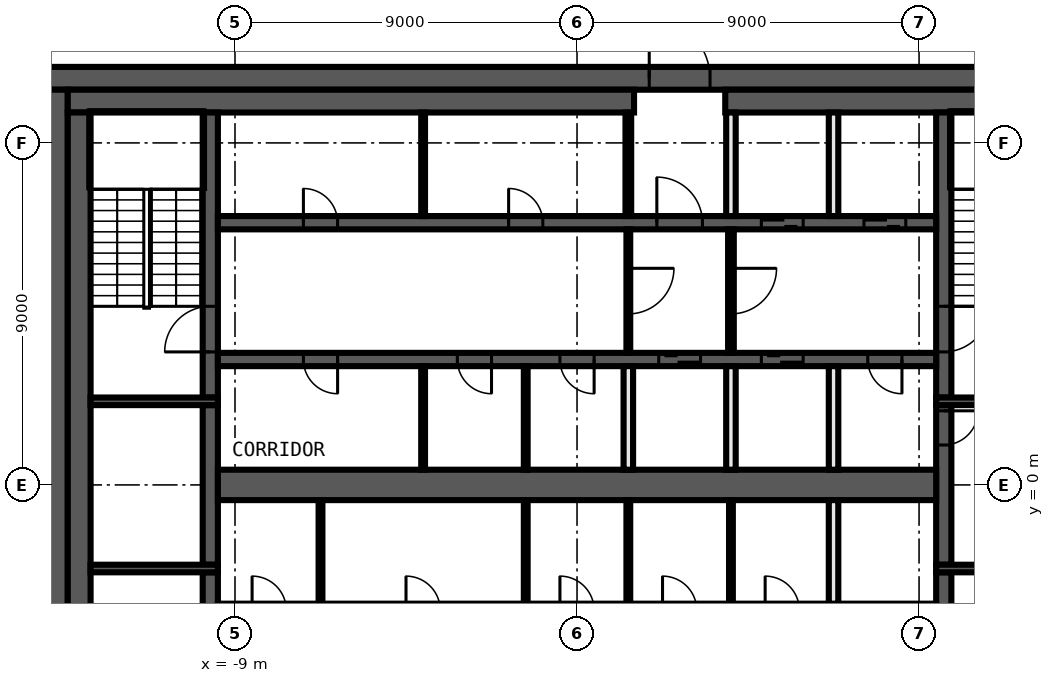
"""IFC4 building model, lengths in metres.
Left out: names, types, materials, properties, quantities, classifications, styles, units other than length and angle.
Written with IfcOpenShell. Run it as: python <this file> out.ifc"""

import sys

from ifc_helpers import new_model, si_unit, direction, frame, frame_2d, origin, place, context, subcontext, project, spatial, rectangle, extrude, element, fill, save


model = new_model("IFC4")
c1 = context("Model", 3, precision=1e-05, world=origin(), true_north=direction((0.0, 1.0)))
c2 = subcontext(c1, "Body", "Model", "MODEL_VIEW")
j1 = project(units=[si_unit("LENGTHUNIT", "METRE"), si_unit("PLANEANGLEUNIT", "RADIAN")], contexts=[c1])
p1 = place(None, origin())
s1 = spatial("IfcSite", under=j1, at=p1, CompositionType="ELEMENT")
p2 = place(p1, origin())
s2 = spatial("IfcBuilding", under=s1, at=p2, CompositionType="ELEMENT")
p3 = place(p2, frame((0.0, 0.0, 294.2)))
s3 = spatial("IfcBuildingStorey", under=s2, at=p3, CompositionType="ELEMENT", Elevation=294.2)
p4 = place(p3, frame((-14.0, 10.7, 0.0), z_axis=(0.0, 0.0, 1.0), x_axis=(1.0, 0.0, 0.0)))
e1 = element("IfcWall", 1, at=p4, inside=s3, PredefinedType="SHEAR", context=c2, shape_type="SweptSolid", body=[
    extrude(rectangle(XDim=28.0, YDim=0.6, at=frame_2d((14.0, 0.0))), origin(), (0.0, 0.0, 1.0), 3.82),
])
p5 = place(p4, frame((15.9, 0.0, 0.0)))
e2 = element("IfcOpeningElement", 2, at=p5, cuts=e1, PredefinedType="OPENING", context=c2, shape_type="SweptSolid", body=[
    extrude(rectangle(XDim=1.6, YDim=2.1, at=frame_2d((0.8, 1.05))), frame((0.0, 0.31, 0.0), z_axis=(0.0, -1.0, 0.0), x_axis=(1.0, 0.0, 0.0)), (0.0, 0.0, 1.0), 0.62),
])
p6 = place(p3, frame((-13.7, -10.4, 0.0), z_axis=(0.0, 0.0, 1.0), x_axis=(0.0, 1.0, 0.0)))
e3 = element("IfcWall", 3, at=p6, inside=s3, PredefinedType="SHEAR", context=c2, shape_type="SweptSolid", body=[
    extrude(rectangle(XDim=20.8, YDim=0.6, at=frame_2d((10.4, 0.0))), origin(), (0.0, 0.0, 1.0), 3.82),
])
p7 = place(p3, frame((-13.4, 10.1, 0.0), z_axis=(0.0, 0.0, 1.0), x_axis=(1.0, 0.0, 0.0)))
e4 = element("IfcWall", 4, at=p7, inside=s3, PredefinedType="SHEAR", context=c2, shape_type="SweptSolid", body=[
    extrude(rectangle(XDim=14.9, YDim=0.6, at=frame_2d((7.45, 0.0))), origin(), (0.0, 0.0, 1.0), 3.82),
])
p8 = place(p3, frame((3.9, 10.1, 0.0), z_axis=(0.0, 0.0, 1.0), x_axis=(1.0, 0.0, 0.0)))
e5 = element("IfcWall", 5, at=p8, inside=s3, PredefinedType="SHEAR", context=c2, shape_type="SweptSolid", body=[
    extrude(rectangle(XDim=9.5, YDim=0.6, at=frame_2d((4.75, 0.0))), origin(), (0.0, 0.0, 1.0), 3.82),
])
p9 = place(p3, frame((-13.1, -9.8, 0.0), z_axis=(0.0, 0.0, 1.0), x_axis=(0.0, 1.0, 0.0)))
e6 = element("IfcWall", 6, at=p9, inside=s3, PredefinedType="SHEAR", context=c2, shape_type="SweptSolid", body=[
    extrude(rectangle(XDim=19.6, YDim=0.6, at=frame_2d((9.8, 0.0))), origin(), (0.0, 0.0, 1.0), 3.82),
])
p10 = place(p3, frame((9.65, -2.3, 0.0), z_axis=(0.0, 0.0, 1.0), x_axis=(0.0, -1.0, 0.0)))
e7 = element("IfcWall", 7, at=p10, inside=s3, PredefinedType="SHEAR", context=c2, shape_type="SweptSolid", body=[
    extrude(rectangle(XDim=7.5, YDim=0.4, at=frame_2d((3.75, 0.0))), origin(), (0.0, 0.0, 1.0), 3.82),
])
p11 = place(p10, frame((1.2, 0.0, 0.0)))
e8 = element("IfcOpeningElement", 8, at=p11, cuts=e7, PredefinedType="OPENING", context=c2, shape_type="SweptSolid", body=[
    extrude(rectangle(XDim=1.2, YDim=2.1, at=frame_2d((0.6, 1.05))), frame((0.0, 0.21, 0.0), z_axis=(0.0, -1.0, 0.0), x_axis=(1.0, 0.0, 0.0)), (0.0, 0.0, 1.0), 0.42),
])
p12 = place(p3, frame((9.65, 2.1, 0.0), z_axis=(0.0, 0.0, 1.0), x_axis=(0.0, -1.0, 0.0)))
e9 = element("IfcWall", 9, at=p12, inside=s3, PredefinedType="SHEAR", context=c2, shape_type="SweptSolid", body=[
    extrude(rectangle(XDim=4.2, YDim=0.4, at=frame_2d((2.1, 0.0))), origin(), (0.0, 0.0, 1.0), 3.82),
])
p13 = place(p12, frame((0.15, 0.0, 0.0)))
e10 = element("IfcOpeningElement", 10, at=p13, cuts=e9, PredefinedType="OPENING", context=c2, shape_type="SweptSolid", body=[
    extrude(rectangle(XDim=0.9, YDim=2.1, at=frame_2d((0.45, 1.05))), frame((0.0, 0.21, 0.0), z_axis=(0.0, -1.0, 0.0), x_axis=(1.0, 0.0, 0.0)), (0.0, 0.0, 1.0), 0.42),
])
p14 = place(p3, frame((9.65, 9.8, 0.0), z_axis=(0.0, 0.0, 1.0), x_axis=(0.0, -1.0, 0.0)))
e11 = element("IfcWall", 11, at=p14, inside=s3, PredefinedType="SHEAR", context=c2, shape_type="SweptSolid", body=[
    extrude(rectangle(XDim=7.5, YDim=0.4, at=frame_2d((3.75, 0.0))), origin(), (0.0, 0.0, 1.0), 3.82),
])
p15 = place(p14, frame((5.1, 0.0, 0.0)))
e12 = element("IfcOpeningElement", 12, at=p15, cuts=e11, PredefinedType="OPENING", context=c2, shape_type="SweptSolid", body=[
    extrude(rectangle(XDim=1.2, YDim=2.1, at=frame_2d((0.6, 1.05))), frame((0.0, 0.21, 0.0), z_axis=(0.0, -1.0, 0.0), x_axis=(1.0, 0.0, 0.0)), (0.0, 0.0, 1.0), 0.42),
])
p16 = place(p3, frame((-9.65, -9.8, 0.0), z_axis=(0.0, 0.0, 1.0), x_axis=(0.0, 1.0, 0.0)))
e13 = element("IfcWall", 13, at=p16, inside=s3, PredefinedType="SHEAR", context=c2, shape_type="SweptSolid", body=[
    extrude(rectangle(XDim=7.5, YDim=0.4, at=frame_2d((3.75, 0.0))), origin(), (0.0, 0.0, 1.0), 3.82),
])
p17 = place(p16, frame((5.1, 0.0, 0.0)))
e14 = element("IfcOpeningElement", 14, at=p17, cuts=e13, PredefinedType="OPENING", context=c2, shape_type="SweptSolid", body=[
    extrude(rectangle(XDim=1.2, YDim=2.1, at=frame_2d((0.6, 1.05))), frame((0.0, 0.21, 0.0), z_axis=(0.0, -1.0, 0.0), x_axis=(1.0, 0.0, 0.0)), (0.0, 0.0, 1.0), 0.42),
])
p18 = place(p3, frame((-9.65, -2.1, 0.0), z_axis=(0.0, 0.0, 1.0), x_axis=(0.0, 1.0, 0.0)))
e15 = element("IfcWall", 15, at=p18, inside=s3, PredefinedType="SHEAR", context=c2, shape_type="SweptSolid", body=[
    extrude(rectangle(XDim=4.2, YDim=0.4, at=frame_2d((2.1, 0.0))), origin(), (0.0, 0.0, 1.0), 3.82),
])
p19 = place(p3, frame((-9.65, 2.3, 0.0), z_axis=(0.0, 0.0, 1.0), x_axis=(0.0, 1.0, 0.0)))
e16 = element("IfcWall", 16, at=p19, inside=s3, PredefinedType="SHEAR", context=c2, shape_type="SweptSolid", body=[
    extrude(rectangle(XDim=7.5, YDim=0.4, at=frame_2d((3.75, 0.0))), origin(), (0.0, 0.0, 1.0), 3.82),
])
p20 = place(p19, frame((1.2, 0.0, 0.0)))
e17 = element("IfcOpeningElement", 17, at=p20, cuts=e16, PredefinedType="OPENING", context=c2, shape_type="SweptSolid", body=[
    extrude(rectangle(XDim=1.2, YDim=2.1, at=frame_2d((0.6, 1.05))), frame((0.0, 0.21, 0.0), z_axis=(0.0, -1.0, 0.0), x_axis=(1.0, 0.0, 0.0)), (0.0, 0.0, 1.0), 0.42),
])
for number, where, z_axis, x_axis in (
    (18, (9.45, 2.2, 0.0), (0.0, 0.0, 1.0), (1.0, 0.0, 0.0)),
    (19, (-9.45, 2.2, 0.0), (0.0, 0.0, 1.0), (-1.0, 0.0, 0.0)),
    (20, (9.45, -2.2, 0.0), (0.0, 0.0, 1.0), (1.0, 0.0, 0.0)),
    (21, (-9.45, -2.2, 0.0), (0.0, 0.0, 1.0), (-1.0, 0.0, 0.0)),
):
    element("IfcWall", number, at=place(p3, frame(where, z_axis=z_axis, x_axis=x_axis)), inside=s3, PredefinedType="SHEAR", context=c2, shape_type="SweptSolid", body=[
        extrude(rectangle(XDim=3.35, YDim=0.2, at=frame_2d((1.675, 0.0))), origin(), (0.0, 0.0, 1.0), 3.82),
    ])
p21 = place(p3, frame((-9.45, 6.9, 0.0), z_axis=(0.0, 0.0, 1.0), x_axis=(1.0, 0.0, 0.0)))
e22 = element("IfcWall", 22, at=p21, inside=s3, PredefinedType="SHEAR", context=c2, shape_type="SweptSolid", body=[
    extrude(rectangle(XDim=18.9, YDim=0.35, at=frame_2d((9.45, 0.0))), origin(), (0.0, 0.0, 1.0), 3.82),
])
p22 = place(p21, frame((11.55, 0.0, 0.0)))
e23 = element("IfcOpeningElement", 23, at=p22, cuts=e22, PredefinedType="OPENING", context=c2, shape_type="SweptSolid", body=[
    extrude(rectangle(XDim=1.2, YDim=2.1, at=frame_2d((0.6, 1.05))), frame((0.0, 0.185, 0.0), z_axis=(0.0, -1.0, 0.0), x_axis=(1.0, 0.0, 0.0)), (0.0, 0.0, 1.0), 0.37),
])
p23 = place(p21, frame((14.3, 0.0, 0.0)))
e24 = element("IfcOpeningElement", 24, at=p23, cuts=e22, PredefinedType="OPENING", context=c2, shape_type="SweptSolid", body=[
    extrude(rectangle(XDim=1.1, YDim=2.1, at=frame_2d((0.55, 1.05))), frame((0.0, 0.185, 0.0), z_axis=(0.0, -1.0, 0.0), x_axis=(1.0, 0.0, 0.0)), (0.0, 0.0, 1.0), 0.37),
])
p24 = place(p21, frame((17.0, 0.0, 0.0)))
e25 = element("IfcOpeningElement", 25, at=p24, cuts=e22, PredefinedType="OPENING", context=c2, shape_type="SweptSolid", body=[
    extrude(rectangle(XDim=1.1, YDim=2.1, at=frame_2d((0.55, 1.05))), frame((0.0, 0.185, 0.0), z_axis=(0.0, -1.0, 0.0), x_axis=(1.0, 0.0, 0.0)), (0.0, 0.0, 1.0), 0.37),
])
p25 = place(p21, frame((2.25, 0.0, 0.0)))
e26 = element("IfcOpeningElement", 26, at=p25, cuts=e22, PredefinedType="OPENING", context=c2, shape_type="SweptSolid", body=[
    extrude(rectangle(XDim=0.9, YDim=2.1, at=frame_2d((0.45, 1.05))), frame((0.0, 0.185, 0.0), z_axis=(0.0, -1.0, 0.0), x_axis=(1.0, 0.0, 0.0)), (0.0, 0.0, 1.0), 0.37),
])
p26 = place(p21, frame((7.65, 0.0, 0.0)))
e27 = element("IfcOpeningElement", 27, at=p26, cuts=e22, PredefinedType="OPENING", context=c2, shape_type="SweptSolid", body=[
    extrude(rectangle(XDim=0.9, YDim=2.1, at=frame_2d((0.45, 1.05))), frame((0.0, 0.185, 0.0), z_axis=(0.0, -1.0, 0.0), x_axis=(1.0, 0.0, 0.0)), (0.0, 0.0, 1.0), 0.37),
])
p27 = place(p3, frame((9.45, 3.3, 0.0), z_axis=(0.0, 0.0, 1.0), x_axis=(-1.0, 0.0, 0.0)))
e28 = element("IfcWall", 28, at=p27, inside=s3, PredefinedType="SHEAR", context=c2, shape_type="SweptSolid", body=[
    extrude(rectangle(XDim=18.9, YDim=0.35, at=frame_2d((9.45, 0.0))), origin(), (0.0, 0.0, 1.0), 3.82),
])
p28 = place(p27, frame((6.2, 0.0, 0.0)))
e29 = element("IfcOpeningElement", 29, at=p28, cuts=e28, PredefinedType="OPENING", context=c2, shape_type="SweptSolid", body=[
    extrude(rectangle(XDim=1.1, YDim=2.1, at=frame_2d((0.55, 1.05))), frame((0.0, 0.185, 0.0), z_axis=(0.0, -1.0, 0.0), x_axis=(1.0, 0.0, 0.0)), (0.0, 0.0, 1.0), 0.37),
])
p29 = place(p27, frame((3.5, 0.0, 0.0)))
e30 = element("IfcOpeningElement", 30, at=p29, cuts=e28, PredefinedType="OPENING", context=c2, shape_type="SweptSolid", body=[
    extrude(rectangle(XDim=1.1, YDim=2.1, at=frame_2d((0.55, 1.05))), frame((0.0, 0.185, 0.0), z_axis=(0.0, -1.0, 0.0), x_axis=(1.0, 0.0, 0.0)), (0.0, 0.0, 1.0), 0.37),
])
p30 = place(p27, frame((0.9, 0.0, 0.0)))
e31 = element("IfcOpeningElement", 31, at=p30, cuts=e28, PredefinedType="OPENING", context=c2, shape_type="SweptSolid", body=[
    extrude(rectangle(XDim=0.9, YDim=2.1, at=frame_2d((0.45, 1.05))), frame((0.0, 0.185, 0.0), z_axis=(0.0, -1.0, 0.0), x_axis=(1.0, 0.0, 0.0)), (0.0, 0.0, 1.0), 0.37),
])
p31 = place(p27, frame((15.75, 0.0, 0.0)))
e32 = element("IfcOpeningElement", 32, at=p31, cuts=e28, PredefinedType="OPENING", context=c2, shape_type="SweptSolid", body=[
    extrude(rectangle(XDim=0.9, YDim=2.1, at=frame_2d((0.45, 1.05))), frame((0.0, 0.185, 0.0), z_axis=(0.0, -1.0, 0.0), x_axis=(1.0, 0.0, 0.0)), (0.0, 0.0, 1.0), 0.37),
])
p32 = place(p27, frame((11.7, 0.0, 0.0)))
e33 = element("IfcOpeningElement", 33, at=p32, cuts=e28, PredefinedType="OPENING", context=c2, shape_type="SweptSolid", body=[
    extrude(rectangle(XDim=0.9, YDim=2.1, at=frame_2d((0.45, 1.05))), frame((0.0, 0.185, 0.0), z_axis=(0.0, -1.0, 0.0), x_axis=(1.0, 0.0, 0.0)), (0.0, 0.0, 1.0), 0.37),
])
p33 = place(p27, frame((9.0, 0.0, 0.0)))
e34 = element("IfcOpeningElement", 34, at=p33, cuts=e28, PredefinedType="OPENING", context=c2, shape_type="SweptSolid", body=[
    extrude(rectangle(XDim=0.9, YDim=2.1, at=frame_2d((0.45, 1.05))), frame((0.0, 0.185, 0.0), z_axis=(0.0, -1.0, 0.0), x_axis=(1.0, 0.0, 0.0)), (0.0, 0.0, 1.0), 0.37),
])
p34 = place(p3, frame((-9.45, 0.0, 0.0), z_axis=(0.0, 0.0, 1.0), x_axis=(1.0, 0.0, 0.0)))
e35 = element("IfcWall", 35, at=p34, inside=s3, PredefinedType="SHEAR", context=c2, shape_type="SweptSolid", body=[
    extrude(rectangle(XDim=18.9, YDim=0.8, at=frame_2d((9.45, 0.0))), origin(), (0.0, 0.0, 1.0), 3.82),
])
for number, where, z_axis, x_axis in (
    (36, (6.75, -3.125, 0.0), (0.0, 0.0, 1.0), (0.0, 1.0, 0.0)),
    (37, (6.75, 0.4, 0.0), (0.0, 0.0, 1.0), (0.0, 1.0, 0.0)),
    (38, (6.75, 7.075, 0.0), (0.0, 0.0, 1.0), (0.0, 1.0, 0.0)),
):
    element("IfcWall", number, at=place(p3, frame(where, z_axis=z_axis, x_axis=x_axis)), inside=s3, PredefinedType="SOLIDWALL", context=c2, shape_type="SweptSolid", body=[
        extrude(rectangle(XDim=2.725, YDim=0.25, at=frame_2d((1.363, 0.0))), origin(), (0.0, 0.0, 1.0), 3.82),
    ])
p35 = place(p3, frame((4.05, 6.725, 0.0), z_axis=(0.0, 0.0, 1.0), x_axis=(0.0, -1.0, 0.0)))
e39 = element("IfcWall", 39, at=p35, inside=s3, PredefinedType="PARTITIONING", context=c2, shape_type="SweptSolid", body=[
    extrude(rectangle(XDim=3.25, YDim=0.15, at=frame_2d((1.625, 0.0))), origin(), (0.0, 0.0, 1.0), 3.82),
])
p36 = place(p35, frame((1.025, 0.0, 0.0)))
e40 = element("IfcOpeningElement", 40, at=p36, cuts=e39, PredefinedType="OPENING", context=c2, shape_type="SweptSolid", body=[
    extrude(rectangle(XDim=1.2, YDim=2.1, at=frame_2d((0.6, 1.05))), frame((0.0, 0.085, 0.0), z_axis=(0.0, -1.0, 0.0), x_axis=(1.0, 0.0, 0.0)), (0.0, 0.0, 1.0), 0.17),
])
p37 = place(p3, frame((4.05, -3.125, 0.0), z_axis=(0.0, 0.0, 1.0), x_axis=(0.0, 1.0, 0.0)))
e41 = element("IfcWall", 41, at=p37, inside=s3, PredefinedType="PARTITIONING", context=c2, shape_type="SweptSolid", body=[
    extrude(rectangle(XDim=2.725, YDim=0.1, at=frame_2d((1.363, 0.0))), origin(), (0.0, 0.0, 1.0), 3.82),
])
for number, where, z_axis, x_axis in (
    (42, (4.05, 0.4, 0.0), (0.0, 0.0, 1.0), (0.0, 1.0, 0.0)),
    (43, (4.05, 7.075, 0.0), (0.0, 0.0, 1.0), (0.0, 1.0, 0.0)),
):
    element("IfcWall", number, at=place(p3, frame(where, z_axis=z_axis, x_axis=x_axis)), inside=s3, PredefinedType="SOLIDWALL", context=c2, shape_type="SweptSolid", body=[
        extrude(rectangle(XDim=2.725, YDim=0.25, at=frame_2d((1.363, 0.0))), origin(), (0.0, 0.0, 1.0), 3.82),
    ])
p38 = place(p3, frame((1.35, 7.075, 0.0), z_axis=(0.0, 0.0, 1.0), x_axis=(0.0, 1.0, 0.0)))
e44 = element("IfcWall", 44, at=p38, inside=s3, PredefinedType="PARTITIONING", context=c2, shape_type="SweptSolid", body=[
    extrude(rectangle(XDim=2.725, YDim=0.15, at=frame_2d((1.363, 0.0))), origin(), (0.0, 0.0, 1.0), 3.82),
])
p39 = place(p3, frame((1.35, -3.125, 0.0), z_axis=(0.0, 0.0, 1.0), x_axis=(0.0, 1.0, 0.0)))
e45 = element("IfcWall", 45, at=p39, inside=s3, PredefinedType="PARTITIONING", context=c2, shape_type="SweptSolid", body=[
    extrude(rectangle(XDim=2.725, YDim=0.1, at=frame_2d((1.363, 0.0))), origin(), (0.0, 0.0, 1.0), 3.82),
])
p40 = place(p3, frame((1.35, 6.725, 0.0), z_axis=(0.0, 0.0, 1.0), x_axis=(0.0, -1.0, 0.0)))
e46 = element("IfcWall", 46, at=p40, inside=s3, PredefinedType="PARTITIONING", context=c2, shape_type="SweptSolid", body=[
    extrude(rectangle(XDim=3.25, YDim=0.1, at=frame_2d((1.625, 0.0))), origin(), (0.0, 0.0, 1.0), 3.82),
])
p41 = place(p40, frame((1.025, 0.0, 0.0)))
e47 = element("IfcOpeningElement", 47, at=p41, cuts=e46, PredefinedType="OPENING", context=c2, shape_type="SweptSolid", body=[
    extrude(rectangle(XDim=1.2, YDim=2.1, at=frame_2d((0.6, 1.05))), frame((0.0, 0.06, 0.0), z_axis=(0.0, -1.0, 0.0), x_axis=(1.0, 0.0, 0.0)), (0.0, 0.0, 1.0), 0.12),
])
p42 = place(p3, frame((1.35, 0.4, 0.0), z_axis=(0.0, 0.0, 1.0), x_axis=(0.0, 1.0, 0.0)))
e48 = element("IfcWall", 48, at=p42, inside=s3, PredefinedType="SOLIDWALL", context=c2, shape_type="SweptSolid", body=[
    extrude(rectangle(XDim=2.725, YDim=0.25, at=frame_2d((1.363, 0.0))), origin(), (0.0, 0.0, 1.0), 3.82),
])
for number, where, z_axis, x_axis in (
    (49, (-1.35, -3.125, 0.0), (0.0, 0.0, 1.0), (0.0, 1.0, 0.0)),
    (50, (-1.35, 0.4, 0.0), (0.0, 0.0, 1.0), (0.0, 1.0, 0.0)),
    (51, (-4.05, 0.4, 0.0), (0.0, 0.0, 1.0), (0.0, 1.0, 0.0)),
    (52, (-4.05, 7.075, 0.0), (0.0, 0.0, 1.0), (0.0, 1.0, 0.0)),
    (53, (-6.75, -3.125, 0.0), (0.0, 0.0, 1.0), (0.0, 1.0, 0.0)),
):
    element("IfcWall", number, at=place(p3, frame(where, z_axis=z_axis, x_axis=x_axis)), inside=s3, PredefinedType="PARTITIONING", context=c2, shape_type="SweptSolid", body=[
        extrude(rectangle(XDim=2.725, YDim=0.1, at=frame_2d((1.363, 0.0))), origin(), (0.0, 0.0, 1.0), 3.82),
    ])
p43 = place(p13, origin())
e54 = element("IfcDoor", 54, at=p43, inside=s3, OperationType="SINGLE_SWING_RIGHT", PredefinedType="DOOR", context=c2, shape_type="SweptSolid", body=[
    extrude(rectangle(XDim=0.9, YDim=2.1, at=frame_2d((0.45, 1.05))), frame((0.0, 0.025, 0.0), z_axis=(0.0, -1.0, 0.0), x_axis=(1.0, 0.0, 0.0)), (0.0, 0.0, 1.0), 0.05),
])
fill(e10, e54)
p44 = place(p5, origin())
e55 = element("IfcDoor", 55, at=p44, inside=s3, OperationType="DOUBLE_DOOR_SINGLE_SWING", PredefinedType="DOOR", context=c2, shape_type="SweptSolid", body=[
    extrude(rectangle(XDim=1.6, YDim=2.1, at=frame_2d((0.8, 1.05))), frame((0.0, 0.025, 0.0), z_axis=(0.0, -1.0, 0.0), x_axis=(1.0, 0.0, 0.0)), (0.0, 0.0, 1.0), 0.05),
])
fill(e2, e55)
p45 = place(p22, origin())
e56 = element("IfcDoor", 56, at=p45, inside=s3, OperationType="SINGLE_SWING_LEFT", PredefinedType="DOOR", context=c2, shape_type="SweptSolid", body=[
    extrude(rectangle(XDim=1.2, YDim=2.1, at=frame_2d((0.6, 1.05))), frame((0.0, 0.025, 0.0), z_axis=(0.0, -1.0, 0.0), x_axis=(1.0, 0.0, 0.0)), (0.0, 0.0, 1.0), 0.05),
])
fill(e23, e56)
p46 = place(p23, origin())
e57 = element("IfcDoor", 57, at=p46, inside=s3, OperationType="DOUBLE_DOOR_SLIDING", PredefinedType="DOOR", context=c2, shape_type="SweptSolid", body=[
    extrude(rectangle(XDim=1.1, YDim=2.1, at=frame_2d((0.55, 1.05))), frame((0.0, 0.025, 0.0), z_axis=(0.0, -1.0, 0.0), x_axis=(1.0, 0.0, 0.0)), (0.0, 0.0, 1.0), 0.05),
])
fill(e24, e57)
p47 = place(p24, origin())
e58 = element("IfcDoor", 58, at=p47, inside=s3, OperationType="DOUBLE_DOOR_SLIDING", PredefinedType="DOOR", context=c2, shape_type="SweptSolid", body=[
    extrude(rectangle(XDim=1.1, YDim=2.1, at=frame_2d((0.55, 1.05))), frame((0.0, 0.025, 0.0), z_axis=(0.0, -1.0, 0.0), x_axis=(1.0, 0.0, 0.0)), (0.0, 0.0, 1.0), 0.05),
])
fill(e25, e58)
p48 = place(p28, origin())
e59 = element("IfcDoor", 59, at=p48, inside=s3, OperationType="DOUBLE_DOOR_SLIDING", PredefinedType="DOOR", context=c2, shape_type="SweptSolid", body=[
    extrude(rectangle(XDim=1.1, YDim=2.1, at=frame_2d((0.55, 1.05))), frame((0.0, 0.025, 0.0), z_axis=(0.0, -1.0, 0.0), x_axis=(1.0, 0.0, 0.0)), (0.0, 0.0, 1.0), 0.05),
])
fill(e29, e59)
p49 = place(p29, origin())
e60 = element("IfcDoor", 60, at=p49, inside=s3, OperationType="DOUBLE_DOOR_SLIDING", PredefinedType="DOOR", context=c2, shape_type="SweptSolid", body=[
    extrude(rectangle(XDim=1.1, YDim=2.1, at=frame_2d((0.55, 1.05))), frame((0.0, 0.025, 0.0), z_axis=(0.0, -1.0, 0.0), x_axis=(1.0, 0.0, 0.0)), (0.0, 0.0, 1.0), 0.05),
])
fill(e30, e60)
p50 = place(p30, origin())
e61 = element("IfcDoor", 61, at=p50, inside=s3, OperationType="SINGLE_SWING_LEFT", PredefinedType="DOOR", context=c2, shape_type="SweptSolid", body=[
    extrude(rectangle(XDim=0.9, YDim=2.1, at=frame_2d((0.45, 1.05))), frame((0.0, 0.025, 0.0), z_axis=(0.0, -1.0, 0.0), x_axis=(1.0, 0.0, 0.0)), (0.0, 0.0, 1.0), 0.05),
])
fill(e31, e61)
p51 = place(p25, origin())
e62 = element("IfcDoor", 62, at=p51, inside=s3, OperationType="SINGLE_SWING_RIGHT", PredefinedType="DOOR", context=c2, shape_type="SweptSolid", body=[
    extrude(rectangle(XDim=0.9, YDim=2.1, at=frame_2d((0.45, 1.05))), frame((0.0, 0.025, 0.0), z_axis=(0.0, -1.0, 0.0), x_axis=(1.0, 0.0, 0.0)), (0.0, 0.0, 1.0), 0.05),
])
fill(e26, e62)
p52 = place(p26, origin())
e63 = element("IfcDoor", 63, at=p52, inside=s3, OperationType="SINGLE_SWING_LEFT", PredefinedType="DOOR", context=c2, shape_type="SweptSolid", body=[
    extrude(rectangle(XDim=0.9, YDim=2.1, at=frame_2d((0.45, 1.05))), frame((0.0, 0.025, 0.0), z_axis=(0.0, -1.0, 0.0), x_axis=(1.0, 0.0, 0.0)), (0.0, 0.0, 1.0), 0.05),
])
fill(e27, e63)
p53 = place(p31, origin())
e64 = element("IfcDoor", 64, at=p53, inside=s3, OperationType="SINGLE_SWING_RIGHT", PredefinedType="DOOR", context=c2, shape_type="SweptSolid", body=[
    extrude(rectangle(XDim=0.9, YDim=2.1, at=frame_2d((0.45, 1.05))), frame((0.0, 0.025, 0.0), z_axis=(0.0, -1.0, 0.0), x_axis=(1.0, 0.0, 0.0)), (0.0, 0.0, 1.0), 0.05),
])
fill(e32, e64)
p54 = place(p32, origin())
e65 = element("IfcDoor", 65, at=p54, inside=s3, OperationType="SINGLE_SWING_LEFT", PredefinedType="DOOR", context=c2, shape_type="SweptSolid", body=[
    extrude(rectangle(XDim=0.9, YDim=2.1, at=frame_2d((0.45, 1.05))), frame((0.0, 0.025, 0.0), z_axis=(0.0, -1.0, 0.0), x_axis=(1.0, 0.0, 0.0)), (0.0, 0.0, 1.0), 0.05),
])
fill(e33, e65)
p55 = place(p33, origin())
e66 = element("IfcDoor", 66, at=p55, inside=s3, OperationType="SINGLE_SWING_RIGHT", PredefinedType="DOOR", context=c2, shape_type="SweptSolid", body=[
    extrude(rectangle(XDim=0.9, YDim=2.1, at=frame_2d((0.45, 1.05))), frame((0.0, 0.025, 0.0), z_axis=(0.0, -1.0, 0.0), x_axis=(1.0, 0.0, 0.0)), (0.0, 0.0, 1.0), 0.05),
])
fill(e34, e66)
p56 = place(p15, origin())
e67 = element("IfcDoor", 67, at=p56, inside=s3, OperationType="SINGLE_SWING_LEFT", PredefinedType="DOOR", context=c2, shape_type="SweptSolid", body=[
    extrude(rectangle(XDim=1.2, YDim=2.1, at=frame_2d((0.6, 1.05))), frame((0.0, 0.025, 0.0), z_axis=(0.0, -1.0, 0.0), x_axis=(1.0, 0.0, 0.0)), (0.0, 0.0, 1.0), 0.05),
])
fill(e12, e67)
p57 = place(p20, origin())
e68 = element("IfcDoor", 68, at=p57, inside=s3, OperationType="SINGLE_SWING_RIGHT", PredefinedType="DOOR", context=c2, shape_type="SweptSolid", body=[
    extrude(rectangle(XDim=1.2, YDim=2.1, at=frame_2d((0.6, 1.05))), frame((0.0, 0.025, 0.0), z_axis=(0.0, -1.0, 0.0), x_axis=(1.0, 0.0, 0.0)), (0.0, 0.0, 1.0), 0.05),
])
fill(e17, e68)
p58 = place(p41, origin())
e69 = element("IfcDoor", 69, at=p58, inside=s3, OperationType="SINGLE_SWING_LEFT", PredefinedType="DOOR", context=c2, shape_type="SweptSolid", body=[
    extrude(rectangle(XDim=1.2, YDim=2.1, at=frame_2d((0.6, 1.05))), frame((0.0, 0.025, 0.0), z_axis=(0.0, -1.0, 0.0), x_axis=(1.0, 0.0, 0.0)), (0.0, 0.0, 1.0), 0.05),
])
fill(e47, e69)
p59 = place(p36, origin())
e70 = element("IfcDoor", 70, at=p59, inside=s3, OperationType="SINGLE_SWING_RIGHT", PredefinedType="DOOR", context=c2, shape_type="SweptSolid", body=[
    extrude(rectangle(XDim=1.2, YDim=2.1, at=frame_2d((0.6, 1.05))), frame((0.0, 0.025, 0.0), z_axis=(0.0, -1.0, 0.0), x_axis=(1.0, 0.0, 0.0)), (0.0, 0.0, 1.0), 0.05),
])
fill(e40, e70)
save(model, sys.argv[1])
